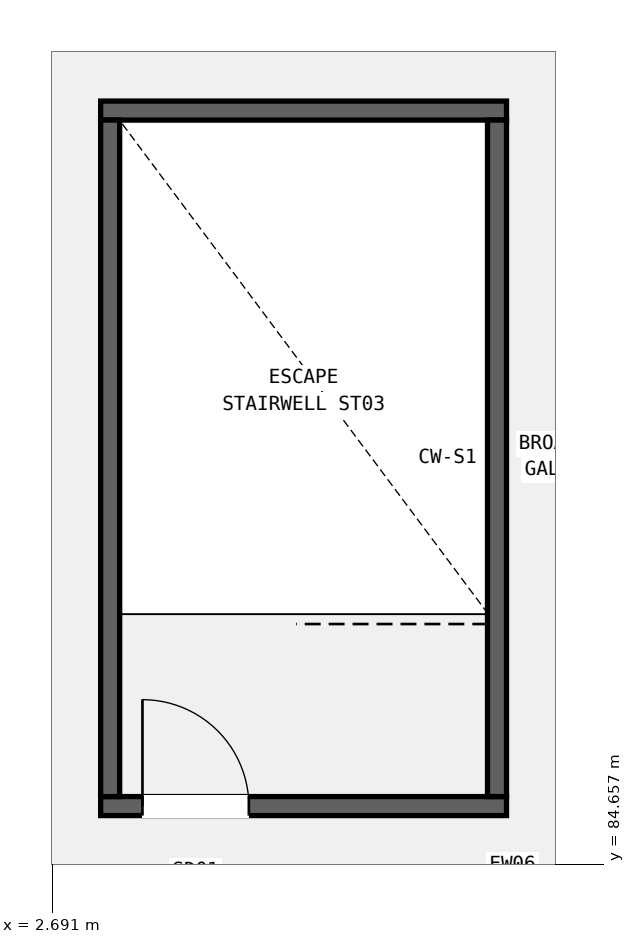
"""IFC4 building model, lengths in metres.
Left out: names, types, materials, properties, quantities, classifications, styles, units other than length and angle.
Written with IfcOpenShell. Run it as: python <this file> out.ifc"""

import sys

from ifc_helpers import new_model, si_unit, direction, frame, frame_2d, origin, place, context, subcontext, project, spatial, rectangle, extrude, element, fill, save


model = new_model("IFC4")
c1 = context("Model", 3, precision=1e-05, world=origin(), true_north=direction((0.0, 1.0)))
c2 = subcontext(c1, "Body", "Model", "MODEL_VIEW")
j1 = project(units=[si_unit("LENGTHUNIT", "METRE"), si_unit("PLANEANGLEUNIT", "RADIAN")], contexts=[c1])
p1 = place(None, origin())
s1 = spatial("IfcSite", under=j1, at=p1, CompositionType="ELEMENT")
p2 = place(p1, origin())
s2 = spatial("IfcBuilding", under=s1, at=p2, CompositionType="ELEMENT")
p3 = place(p2, frame((0.0, 0.0, 25.8)))
s3 = spatial("IfcBuildingStorey", under=s2, at=p3, CompositionType="ELEMENT", Elevation=25.8)
p4 = place(p3, frame((3.33, 85.425, 0.0), z_axis=(0.0, 0.0, 1.0), x_axis=(1.0, 0.0, 0.0)))
e1 = element("IfcWall", 1, at=p4, inside=s3, PredefinedType="SHEAR", context=c2, shape_type="SweptSolid", body=[
    extrude(rectangle(XDim=5.34, YDim=0.25, at=frame_2d((2.67, 0.0))), origin(), (0.0, 0.0, 1.0), 5.04),
])
p5 = place(p4, frame((0.55, 0.0, 0.0)))
e2 = element("IfcOpeningElement", 2, at=p5, cuts=e1, PredefinedType="OPENING", context=c2, shape_type="SweptSolid", body=[
    extrude(rectangle(XDim=1.4, YDim=2.15, at=frame_2d((0.7, 1.075))), frame((0.0, 0.135, 0.0), z_axis=(0.0, -1.0, 0.0), x_axis=(1.0, 0.0, 0.0)), (0.0, 0.0, 1.0), 0.27),
])
p6 = place(p3, frame((3.33, 94.575, 0.0), z_axis=(0.0, 0.0, 1.0), x_axis=(1.0, 0.0, 0.0)))
e3 = element("IfcWall", 3, at=p6, inside=s3, PredefinedType="SHEAR", context=c2, shape_type="SweptSolid", body=[
    extrude(rectangle(XDim=5.34, YDim=0.25, at=frame_2d((2.67, 0.0))), origin(), (0.0, 0.0, 1.0), 5.04),
])
for number, where, z_axis, x_axis in (
    (4, (3.455, 85.55, 0.0), (0.0, 0.0, 1.0), (0.0, 1.0, 0.0)),
    (5, (8.545, 85.55, 0.0), (0.0, 0.0, 1.0), (0.0, 1.0, 0.0)),
):
    element("IfcWall", number, at=place(p3, frame(where, z_axis=z_axis, x_axis=x_axis)), inside=s3, PredefinedType="SHEAR", context=c2, shape_type="SweptSolid", body=[
        extrude(rectangle(XDim=8.9, YDim=0.25, at=frame_2d((4.45, 0.0))), origin(), (0.0, 0.0, 1.0), 5.04),
    ])
p7 = place(p5, origin())
e6 = element("IfcDoor", 6, at=p7, inside=s3, OperationType="SINGLE_SWING_LEFT", PredefinedType="DOOR", context=c2, shape_type="SweptSolid", body=[
    extrude(rectangle(XDim=1.4, YDim=2.15, at=frame_2d((0.7, 1.075))), frame((0.0, 0.025, 0.0), z_axis=(0.0, -1.0, 0.0), x_axis=(1.0, 0.0, 0.0)), (0.0, 0.0, 1.0), 0.05),
])
fill(e2, e6)
save(model, sys.argv[1])
